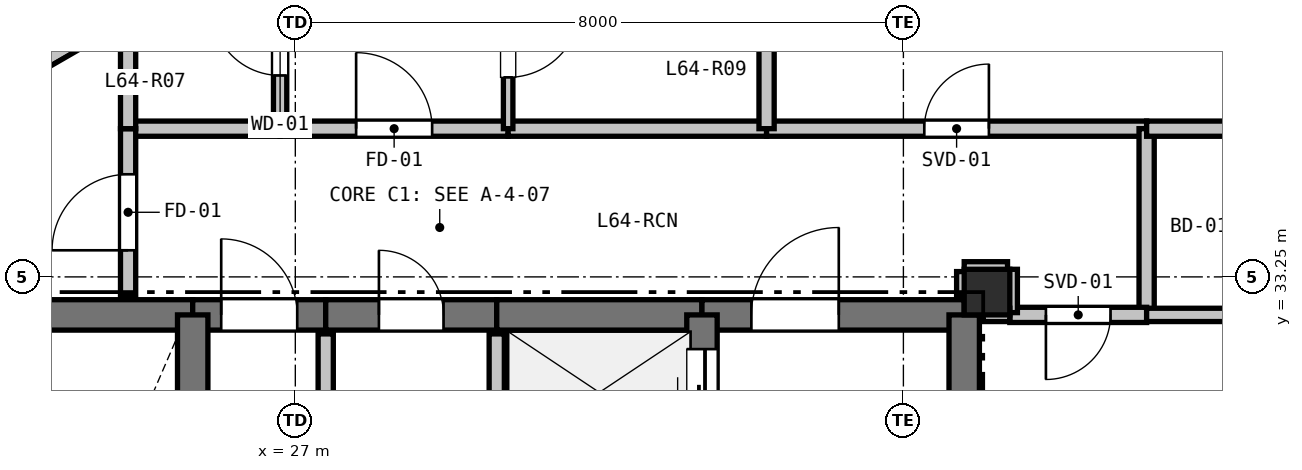
"""IFC4 building model, lengths in metres.
Left out: names, types, materials, properties, quantities, classifications, styles, units other than length and angle.
Written with IfcOpenShell. Run it as: python <this file> out.ifc"""

import sys

from ifc_helpers import new_model, si_unit, direction, frame, frame_2d, origin, origin_2d, place, context, subcontext, project, spatial, rectangle, extrude, element, fill, save


model = new_model("IFC4")
c1 = context("Model", 3, precision=1e-05, world=origin(), true_north=direction((0.0, 1.0)))
c2 = subcontext(c1, "Body", "Model", "MODEL_VIEW")
j1 = project(units=[si_unit("LENGTHUNIT", "METRE"), si_unit("PLANEANGLEUNIT", "RADIAN")], contexts=[c1])
p1 = place(None, origin())
s1 = spatial("IfcSite", under=j1, at=p1, CompositionType="ELEMENT")
p2 = place(p1, origin())
s2 = spatial("IfcBuilding", under=s1, at=p2, CompositionType="ELEMENT")
p3 = place(p2, frame((0.0, 0.0, 229.8)))
s3 = spatial("IfcBuildingStorey", under=s2, at=p3, CompositionType="ELEMENT", Elevation=229.8)
p4 = place(p3, frame((36.1, 33.05, 0.0), z_axis=(0.0, 0.0, 1.0), x_axis=(1.0, 0.0, 0.0)))
e1 = element("IfcColumn", 1, at=p4, inside=s3, PredefinedType="COLUMN", context=c2, shape_type="SweptSolid", body=[
    extrude(rectangle(XDim=0.6, YDim=0.6, at=origin_2d()), origin(), (0.0, 0.0, 1.0), 3.3),
])
p5 = place(p3, frame((20.066, 33.997, 0.0), z_axis=(0.0, 0.0, 1.0), x_axis=(0.866019557082, 0.500010126649, 0.0)))
e2 = element("IfcWall", 2, at=p5, inside=s3, PredefinedType="PARAPET", context=c2, shape_type="SweptSolid", body=[
    extrude(rectangle(XDim=8.228, YDim=0.2, at=frame_2d((4.114, 0.0))), origin(), (0.0, 0.0, 1.0), 0.2),
])
p6 = place(p3, frame((22.2, 32.75, 0.0), z_axis=(0.0, 0.0, 1.0), x_axis=(1.0, 0.0, 0.0)))
e3 = element("IfcWall", 3, at=p6, inside=s3, PredefinedType="SHEAR", context=c2, shape_type="SweptSolid", body=[
    extrude(rectangle(XDim=3.45, YDim=0.4, at=frame_2d((1.725, 0.0))), origin(), (0.0, 0.0, 1.0), 3.08),
])
p7 = place(p3, frame((25.65, 32.75, 0.0), z_axis=(0.0, 0.0, 1.0), x_axis=(1.0, 0.0, 0.0)))
e4 = element("IfcWall", 4, at=p7, inside=s3, PredefinedType="SHEAR", context=c2, shape_type="SweptSolid", body=[
    extrude(rectangle(XDim=1.75, YDim=0.4, at=frame_2d((0.875, 0.0))), origin(), (0.0, 0.0, 1.0), 3.08),
])
p8 = place(p7, frame((0.375, 0.0, 0.0)))
e5 = element("IfcOpeningElement", 5, at=p8, cuts=e4, PredefinedType="OPENING", context=c2, shape_type="SweptSolid", body=[
    extrude(rectangle(XDim=1.0, YDim=2.15, at=frame_2d((0.5, 1.075))), frame((0.0, 0.21, 0.0), z_axis=(0.0, -1.0, 0.0), x_axis=(1.0, 0.0, 0.0)), (0.0, 0.0, 1.0), 0.42),
])
p9 = place(p3, frame((27.4, 32.75, 0.0), z_axis=(0.0, 0.0, 1.0), x_axis=(1.0, 0.0, 0.0)))
e6 = element("IfcWall", 6, at=p9, inside=s3, PredefinedType="SHEAR", context=c2, shape_type="SweptSolid", body=[
    extrude(rectangle(XDim=2.25, YDim=0.4, at=frame_2d((1.125, 0.0))), origin(), (0.0, 0.0, 1.0), 3.08),
])
p10 = place(p9, frame((0.7, 0.0, 0.0)))
e7 = element("IfcOpeningElement", 7, at=p10, cuts=e6, PredefinedType="OPENING", context=c2, shape_type="SweptSolid", body=[
    extrude(rectangle(XDim=0.85, YDim=2.1, at=frame_2d((0.425, 1.05))), frame((0.0, 0.21, 0.0), z_axis=(0.0, -1.0, 0.0), x_axis=(1.0, 0.0, 0.0)), (0.0, 0.0, 1.0), 0.42),
])
p11 = place(p3, frame((29.65, 32.75, 0.0), z_axis=(0.0, 0.0, 1.0), x_axis=(1.0, 0.0, 0.0)))
e8 = element("IfcWall", 8, at=p11, inside=s3, PredefinedType="SHEAR", context=c2, shape_type="SweptSolid", body=[
    extrude(rectangle(XDim=2.7, YDim=0.4, at=frame_2d((1.35, 0.0))), origin(), (0.0, 0.0, 1.0), 3.08),
])
p12 = place(p3, frame((32.35, 32.75, 0.0), z_axis=(0.0, 0.0, 1.0), x_axis=(1.0, 0.0, 0.0)))
e9 = element("IfcWall", 9, at=p12, inside=s3, PredefinedType="SHEAR", context=c2, shape_type="SweptSolid", body=[
    extrude(rectangle(XDim=3.45, YDim=0.4, at=frame_2d((1.725, 0.0))), origin(), (0.0, 0.0, 1.0), 3.08),
])
p13 = place(p12, frame((0.65, 0.0, 0.0)))
e10 = element("IfcOpeningElement", 10, at=p13, cuts=e9, PredefinedType="OPENING", context=c2, shape_type="SweptSolid", body=[
    extrude(rectangle(XDim=1.15, YDim=2.15, at=frame_2d((0.575, 1.075))), frame((0.0, 0.21, 0.0), z_axis=(0.0, -1.0, 0.0), x_axis=(1.0, 0.0, 0.0)), (0.0, 0.0, 1.0), 0.42),
])
p14 = place(p3, frame((35.8, 32.75, 0.0), z_axis=(0.0, 0.0, 1.0), x_axis=(0.0, -1.0, 0.0)))
e11 = element("IfcWall", 11, at=p14, inside=s3, PredefinedType="SHEAR", context=c2, shape_type="SweptSolid", body=[
    extrude(rectangle(XDim=4.65, YDim=0.4, at=frame_2d((2.325, 0.0))), origin(), (0.0, 0.0, 1.0), 3.08),
])
p15 = place(p3, frame((25.65, 27.95, 0.0), z_axis=(0.0, 0.0, 1.0), x_axis=(0.0, 1.0, 0.0)))
e12 = element("IfcWall", 12, at=p15, inside=s3, PredefinedType="SHEAR", context=c2, shape_type="SweptSolid", body=[
    extrude(rectangle(XDim=4.8, YDim=0.4, at=frame_2d((2.4, 0.0))), origin(), (0.0, 0.0, 1.0), 3.08),
])
p16 = place(p3, frame((32.35, 30.75, 0.0), z_axis=(0.0, 0.0, 1.0), x_axis=(0.0, 1.0, 0.0)))
e13 = element("IfcWall", 13, at=p16, inside=s3, PredefinedType="SHEAR", context=c2, shape_type="SweptSolid", body=[
    extrude(rectangle(XDim=2.0, YDim=0.4, at=frame_2d((1.0, 0.0))), origin(), (0.0, 0.0, 1.0), 3.08),
])
p17 = place(p16, frame((0.45, 0.0, 0.0)))
e14 = element("IfcOpeningElement", 14, at=p17, cuts=e13, PredefinedType="OPENING", context=c2, shape_type="SweptSolid", body=[
    extrude(rectangle(XDim=1.1, YDim=2.15, at=frame_2d((0.55, 1.075))), frame((0.0, 0.21, 0.0), z_axis=(0.0, -1.0, 0.0), x_axis=(1.0, 0.0, 0.0)), (0.0, 0.0, 1.0), 0.42),
])
p18 = place(p3, frame((29.65, 30.3, 0.0), z_axis=(0.0, 0.0, 1.0), x_axis=(0.0, 1.0, 0.0)))
e15 = element("IfcWall", 15, at=p18, inside=s3, PredefinedType="PARTITIONING", context=c2, shape_type="SweptSolid", body=[
    extrude(rectangle(XDim=2.2, YDim=0.2, at=frame_2d((1.1, 0.0))), origin(), (0.0, 0.0, 1.0), 3.08),
])
p19 = place(p3, frame((27.4, 32.5, 0.0), z_axis=(0.0, 0.0, 1.0), x_axis=(0.0, -1.0, 0.0)))
e16 = element("IfcWall", 16, at=p19, inside=s3, PredefinedType="PARTITIONING", context=c2, shape_type="SweptSolid", body=[
    extrude(rectangle(XDim=3.25, YDim=0.2, at=frame_2d((1.625, 0.0))), origin(), (0.0, 0.0, 1.0), 3.08),
])
p20 = place(p19, frame((1.2, 0.0, 0.0)))
e17 = element("IfcOpeningElement", 17, at=p20, cuts=e16, PredefinedType="OPENING", context=c2, shape_type="SweptSolid", body=[
    extrude(rectangle(XDim=0.85, YDim=2.1, at=frame_2d((0.425, 1.05))), frame((0.0, 0.11, 0.0), z_axis=(0.0, -1.0, 0.0), x_axis=(1.0, 0.0, 0.0)), (0.0, 0.0, 1.0), 0.22),
])
p21 = place(p3, frame((24.8, 35.2, 0.0), z_axis=(0.0, 0.0, 1.0), x_axis=(1.0, 0.0, 0.0)))
e18 = element("IfcWall", 18, at=p21, inside=s3, PredefinedType="PARTITIONING", context=c2, shape_type="SweptSolid", body=[
    extrude(rectangle(XDim=2.0, YDim=0.2, at=frame_2d((1.0, 0.0))), origin(), (0.0, 0.0, 1.0), 3.08),
])
p22 = place(p3, frame((26.8, 35.2, 0.0), z_axis=(0.0, 0.0, 1.0), x_axis=(1.0, 0.0, 0.0)))
e19 = element("IfcWall", 19, at=p22, inside=s3, PredefinedType="PARTITIONING", context=c2, shape_type="SweptSolid", body=[
    extrude(rectangle(XDim=3.0, YDim=0.2, at=frame_2d((1.5, 0.0))), origin(), (0.0, 0.0, 1.0), 3.08),
])
p23 = place(p22, frame((1.0, 0.0, 0.0)))
e20 = element("IfcOpeningElement", 20, at=p23, cuts=e19, PredefinedType="OPENING", context=c2, shape_type="SweptSolid", body=[
    extrude(rectangle(XDim=1.0, YDim=2.15, at=frame_2d((0.5, 1.075))), frame((0.0, 0.11, 0.0), z_axis=(0.0, -1.0, 0.0), x_axis=(1.0, 0.0, 0.0)), (0.0, 0.0, 1.0), 0.22),
])
p24 = place(p3, frame((29.8, 35.2, 0.0), z_axis=(0.0, 0.0, 1.0), x_axis=(1.0, 0.0, 0.0)))
e21 = element("IfcWall", 21, at=p24, inside=s3, PredefinedType="PARTITIONING", context=c2, shape_type="SweptSolid", body=[
    extrude(rectangle(XDim=3.4, YDim=0.2, at=frame_2d((1.7, 0.0))), origin(), (0.0, 0.0, 1.0), 3.08),
])
p25 = place(p3, frame((33.2, 35.2, 0.0), z_axis=(0.0, 0.0, 1.0), x_axis=(1.0, 0.0, 0.0)))
e22 = element("IfcWall", 22, at=p25, inside=s3, PredefinedType="PARTITIONING", context=c2, shape_type="SweptSolid", body=[
    extrude(rectangle(XDim=5.0, YDim=0.2, at=frame_2d((2.5, 0.0))), origin(), (0.0, 0.0, 1.0), 2.528),
])
p26 = place(p25, frame((2.075, 0.0, 0.0)))
e23 = element("IfcOpeningElement", 23, at=p26, cuts=e22, PredefinedType="OPENING", context=c2, shape_type="SweptSolid", body=[
    extrude(rectangle(XDim=0.85, YDim=2.1, at=frame_2d((0.425, 1.05))), frame((0.0, 0.11, 0.0), z_axis=(0.0, -1.0, 0.0), x_axis=(1.0, 0.0, 0.0)), (0.0, 0.0, 1.0), 0.22),
])
p27 = place(p3, frame((38.2, 35.2, 0.0), z_axis=(0.0, 0.0, 1.0), x_axis=(0.0, -1.0, 0.0)))
e24 = element("IfcWall", 24, at=p27, inside=s3, PredefinedType="PARTITIONING", context=c2, shape_type="SweptSolid", body=[
    extrude(rectangle(XDim=2.45, YDim=0.2, at=frame_2d((1.225, 0.0))), origin(), (0.0, 0.0, 1.0), 3.08),
])
p28 = place(p3, frame((38.2, 32.75, 0.0), z_axis=(0.0, 0.0, 1.0), x_axis=(-1.0, 0.0, 0.0)))
e25 = element("IfcWall", 25, at=p28, inside=s3, PredefinedType="PARTITIONING", context=c2, shape_type="SweptSolid", body=[
    extrude(rectangle(XDim=1.8, YDim=0.2, at=frame_2d((0.9, 0.0))), origin(), (0.0, 0.0, 1.0), 3.08),
])
p29 = place(p28, frame((0.475, 0.0, 0.0)))
e26 = element("IfcOpeningElement", 26, at=p29, cuts=e25, PredefinedType="OPENING", context=c2, shape_type="SweptSolid", body=[
    extrude(rectangle(XDim=0.85, YDim=2.1, at=frame_2d((0.425, 1.05))), frame((0.0, 0.11, 0.0), z_axis=(0.0, -1.0, 0.0), x_axis=(1.0, 0.0, 0.0)), (0.0, 0.0, 1.0), 0.22),
])
for number, where, z_axis, x_axis in (
    (27, (36.4, 32.78, 0.0), (0.0, 0.0, 1.0), (0.0, 1.0, 0.0)),
    (28, (36.37, 33.35, 0.0), (0.0, 0.0, 1.0), (-1.0, 0.0, 0.0)),
):
    element("IfcWall", number, at=place(p3, frame(where, z_axis=z_axis, x_axis=x_axis)), inside=s3, PredefinedType="PARTITIONING", context=c2, shape_type="SweptSolid", body=[
        extrude(rectangle(XDim=0.57, YDim=0.2, at=frame_2d((0.285, 0.0))), origin(), (0.0, 0.0, 1.0), 2.528),
    ])
p30 = place(p3, frame((35.8, 33.32, 0.0), z_axis=(0.0, 0.0, 1.0), x_axis=(0.0, -1.0, 0.0)))
e29 = element("IfcWall", 29, at=p30, inside=s3, PredefinedType="PARTITIONING", context=c2, shape_type="SweptSolid", body=[
    extrude(rectangle(XDim=0.32, YDim=0.2, at=frame_2d((0.16, 0.0))), origin(), (0.0, 0.0, 1.0), 2.605),
])
p31 = place(p3, frame((24.8, 33.0, 0.0), z_axis=(0.0, 0.0, 1.0), x_axis=(0.0, 1.0, 0.0)))
e30 = element("IfcWall", 30, at=p31, inside=s3, PredefinedType="PARTITIONING", context=c2, shape_type="SweptSolid", body=[
    extrude(rectangle(XDim=2.2, YDim=0.2, at=frame_2d((1.1, 0.0))), origin(), (0.0, 0.0, 1.0), 2.605),
])
p32 = place(p31, frame((0.6, 0.0, 0.0)))
e31 = element("IfcOpeningElement", 31, at=p32, cuts=e30, PredefinedType="OPENING", context=c2, shape_type="SweptSolid", body=[
    extrude(rectangle(XDim=1.0, YDim=2.15, at=frame_2d((0.5, 1.075))), frame((0.0, 0.11, 0.0), z_axis=(0.0, -1.0, 0.0), x_axis=(1.0, 0.0, 0.0)), (0.0, 0.0, 1.0), 0.22),
])
p33 = place(p3, frame((29.8, 37.5, 0.0), z_axis=(0.0, 0.0, 1.0), x_axis=(0.0, -1.0, 0.0)))
e32 = element("IfcWall", 32, at=p33, inside=s3, PredefinedType="PARTITIONING", context=c2, shape_type="SweptSolid", body=[
    extrude(rectangle(XDim=2.3, YDim=0.125, at=frame_2d((1.15, 0.0))), origin(), (0.0, 0.0, 1.0), 3.08),
])
p34 = place(p33, frame((0.675, 0.0, 0.0)))
e33 = element("IfcOpeningElement", 33, at=p34, cuts=e32, PredefinedType="OPENING", context=c2, shape_type="SweptSolid", body=[
    extrude(rectangle(XDim=0.95, YDim=2.1, at=frame_2d((0.475, 1.05))), frame((0.0, 0.073, 0.0), z_axis=(0.0, -1.0, 0.0), x_axis=(1.0, 0.0, 0.0)), (0.0, 0.0, 1.0), 0.145),
])
p35 = place(p3, frame((26.8, 35.2, 0.0), z_axis=(0.0, 0.0, 1.0), x_axis=(0.0, 1.0, 0.0)))
e34 = element("IfcWall", 34, at=p35, inside=s3, PredefinedType="PLUMBINGWALL", context=c2, shape_type="SweptSolid", body=[
    extrude(rectangle(XDim=2.3, YDim=0.175, at=frame_2d((1.15, 0.0))), origin(), (0.0, 0.0, 1.0), 2.365),
])
p36 = place(p35, frame((0.7, 0.0, 0.0)))
e35 = element("IfcOpeningElement", 35, at=p36, cuts=e34, PredefinedType="OPENING", context=c2, shape_type="SweptSolid", body=[
    extrude(rectangle(XDim=0.9, YDim=2.1, at=frame_2d((0.45, 1.05))), frame((0.0, 0.097, 0.0), z_axis=(0.0, -1.0, 0.0), x_axis=(1.0, 0.0, 0.0)), (0.0, 0.0, 1.0), 0.195),
])
p37 = place(p3, frame((36.05, 32.75, 0.0), z_axis=(0.0, 0.0, 1.0), x_axis=(1.0, 0.0, 0.0)))
e36 = element("IfcWall", 36, at=p37, inside=s3, PredefinedType="PLUMBINGWALL", context=c2, shape_type="SweptSolid", body=[
    extrude(rectangle(XDim=0.35, YDim=0.175, at=frame_2d((0.175, 0.0))), origin(), (0.0, 0.0, 1.0), 2.605),
])
p38 = place(p3, frame((38.2, 32.75, 0.0), z_axis=(0.0, 0.0, 1.0), x_axis=(1.0, 0.0, 0.0)))
e37 = element("IfcWall", 37, at=p38, inside=s3, PredefinedType="PLUMBINGWALL", context=c2, shape_type="SweptSolid", body=[
    extrude(rectangle(XDim=1.406, YDim=0.175, at=frame_2d((0.703, 0.0))), origin(), (0.0, 0.0, 1.0), 2.365),
])
p39 = place(p3, frame((24.8, 35.2, 0.0), z_axis=(0.0, 0.0, 1.0), x_axis=(0.0, 1.0, 0.0)))
e38 = element("IfcWall", 38, at=p39, inside=s3, PredefinedType="PARTITIONING", context=c2, shape_type="SweptSolid", body=[
    extrude(rectangle(XDim=1.484, YDim=0.2, at=frame_2d((0.742, 0.0))), origin(), (0.0, 0.0, 1.0), 2.365),
])
p40 = place(p3, frame((33.2, 37.5, 0.0), z_axis=(0.0, 0.0, 1.0), x_axis=(0.0, -1.0, 0.0)))
e39 = element("IfcWall", 39, at=p40, inside=s3, PredefinedType="PARTITIONING", context=c2, shape_type="SweptSolid", body=[
    extrude(rectangle(XDim=2.3, YDim=0.2, at=frame_2d((1.15, 0.0))), origin(), (0.0, 0.0, 1.0), 3.08),
])
p41 = place(p3, frame((39.606, 35.2, 0.0), z_axis=(0.0, 0.0, 1.0), x_axis=(-1.0, 0.0, 0.0)))
e40 = element("IfcWall", 40, at=p41, inside=s3, PredefinedType="PARTITIONING", context=c2, shape_type="SweptSolid", body=[
    extrude(rectangle(XDim=1.406, YDim=0.2, at=frame_2d((0.703, 0.0))), origin(), (0.0, 0.0, 1.0), 2.365),
])
p42 = place(p8, origin())
e41 = element("IfcDoor", 41, at=p42, inside=s3, OperationType="SINGLE_SWING_LEFT", PredefinedType="DOOR", context=c2, shape_type="SweptSolid", body=[
    extrude(rectangle(XDim=1.0, YDim=2.15, at=frame_2d((0.5, 1.075))), frame((0.0, 0.025, 0.0), z_axis=(0.0, -1.0, 0.0), x_axis=(1.0, 0.0, 0.0)), (0.0, 0.0, 1.0), 0.05),
])
fill(e5, e41)
p43 = place(p17, origin())
e42 = element("IfcDoor", 42, at=p43, inside=s3, OperationType="SLIDING_TO_LEFT", PredefinedType="DOOR", context=c2, shape_type="SweptSolid", body=[
    extrude(rectangle(XDim=1.1, YDim=2.15, at=frame_2d((0.55, 1.075))), frame((0.0, 0.025, 0.0), z_axis=(0.0, -1.0, 0.0), x_axis=(1.0, 0.0, 0.0)), (0.0, 0.0, 1.0), 0.05),
])
fill(e14, e42)
p44 = place(p13, origin())
e43 = element("IfcDoor", 43, at=p44, inside=s3, OperationType="SINGLE_SWING_RIGHT", PredefinedType="DOOR", context=c2, shape_type="SweptSolid", body=[
    extrude(rectangle(XDim=1.15, YDim=2.15, at=frame_2d((0.575, 1.075))), frame((0.0, 0.025, 0.0), z_axis=(0.0, -1.0, 0.0), x_axis=(1.0, 0.0, 0.0)), (0.0, 0.0, 1.0), 0.05),
])
fill(e10, e43)
p45 = place(p23, origin())
e44 = element("IfcDoor", 44, at=p45, inside=s3, OperationType="SINGLE_SWING_LEFT", PredefinedType="DOOR", context=c2, shape_type="SweptSolid", body=[
    extrude(rectangle(XDim=1.0, YDim=2.15, at=frame_2d((0.5, 1.075))), frame((0.0, 0.025, 0.0), z_axis=(0.0, -1.0, 0.0), x_axis=(1.0, 0.0, 0.0)), (0.0, 0.0, 1.0), 0.05),
])
fill(e20, e44)
p46 = place(p29, origin())
e45 = element("IfcDoor", 45, at=p46, inside=s3, OperationType="SINGLE_SWING_RIGHT", PredefinedType="DOOR", context=c2, shape_type="SweptSolid", body=[
    extrude(rectangle(XDim=0.85, YDim=2.1, at=frame_2d((0.425, 1.05))), frame((0.0, 0.025, 0.0), z_axis=(0.0, -1.0, 0.0), x_axis=(1.0, 0.0, 0.0)), (0.0, 0.0, 1.0), 0.05),
])
fill(e26, e45)
p47 = place(p10, origin())
e46 = element("IfcDoor", 46, at=p47, inside=s3, OperationType="SINGLE_SWING_LEFT", PredefinedType="DOOR", context=c2, shape_type="SweptSolid", body=[
    extrude(rectangle(XDim=0.85, YDim=2.1, at=frame_2d((0.425, 1.05))), frame((0.0, 0.025, 0.0), z_axis=(0.0, -1.0, 0.0), x_axis=(1.0, 0.0, 0.0)), (0.0, 0.0, 1.0), 0.05),
])
fill(e7, e46)
p48 = place(p26, origin())
e47 = element("IfcDoor", 47, at=p48, inside=s3, OperationType="SINGLE_SWING_RIGHT", PredefinedType="DOOR", context=c2, shape_type="SweptSolid", body=[
    extrude(rectangle(XDim=0.85, YDim=2.1, at=frame_2d((0.425, 1.05))), frame((0.0, 0.025, 0.0), z_axis=(0.0, -1.0, 0.0), x_axis=(1.0, 0.0, 0.0)), (0.0, 0.0, 1.0), 0.05),
])
fill(e23, e47)
p49 = place(p32, origin())
e48 = element("IfcDoor", 48, at=p49, inside=s3, OperationType="SINGLE_SWING_LEFT", PredefinedType="DOOR", context=c2, shape_type="SweptSolid", body=[
    extrude(rectangle(XDim=1.0, YDim=2.15, at=frame_2d((0.5, 1.075))), frame((0.0, 0.025, 0.0), z_axis=(0.0, -1.0, 0.0), x_axis=(1.0, 0.0, 0.0)), (0.0, 0.0, 1.0), 0.05),
])
fill(e31, e48)
p50 = place(p36, origin())
e49 = element("IfcDoor", 49, at=p50, inside=s3, OperationType="SINGLE_SWING_RIGHT", PredefinedType="DOOR", context=c2, shape_type="SweptSolid", body=[
    extrude(rectangle(XDim=0.9, YDim=2.1, at=frame_2d((0.45, 1.05))), frame((0.0, 0.025, 0.0), z_axis=(0.0, -1.0, 0.0), x_axis=(1.0, 0.0, 0.0)), (0.0, 0.0, 1.0), 0.05),
])
fill(e35, e49)
p51 = place(p34, origin())
e50 = element("IfcDoor", 50, at=p51, inside=s3, OperationType="SINGLE_SWING_LEFT", PredefinedType="DOOR", context=c2, shape_type="SweptSolid", body=[
    extrude(rectangle(XDim=0.95, YDim=2.1, at=frame_2d((0.475, 1.05))), frame((0.0, 0.025, 0.0), z_axis=(0.0, -1.0, 0.0), x_axis=(1.0, 0.0, 0.0)), (0.0, 0.0, 1.0), 0.05),
])
fill(e33, e50)
save(model, sys.argv[1])
